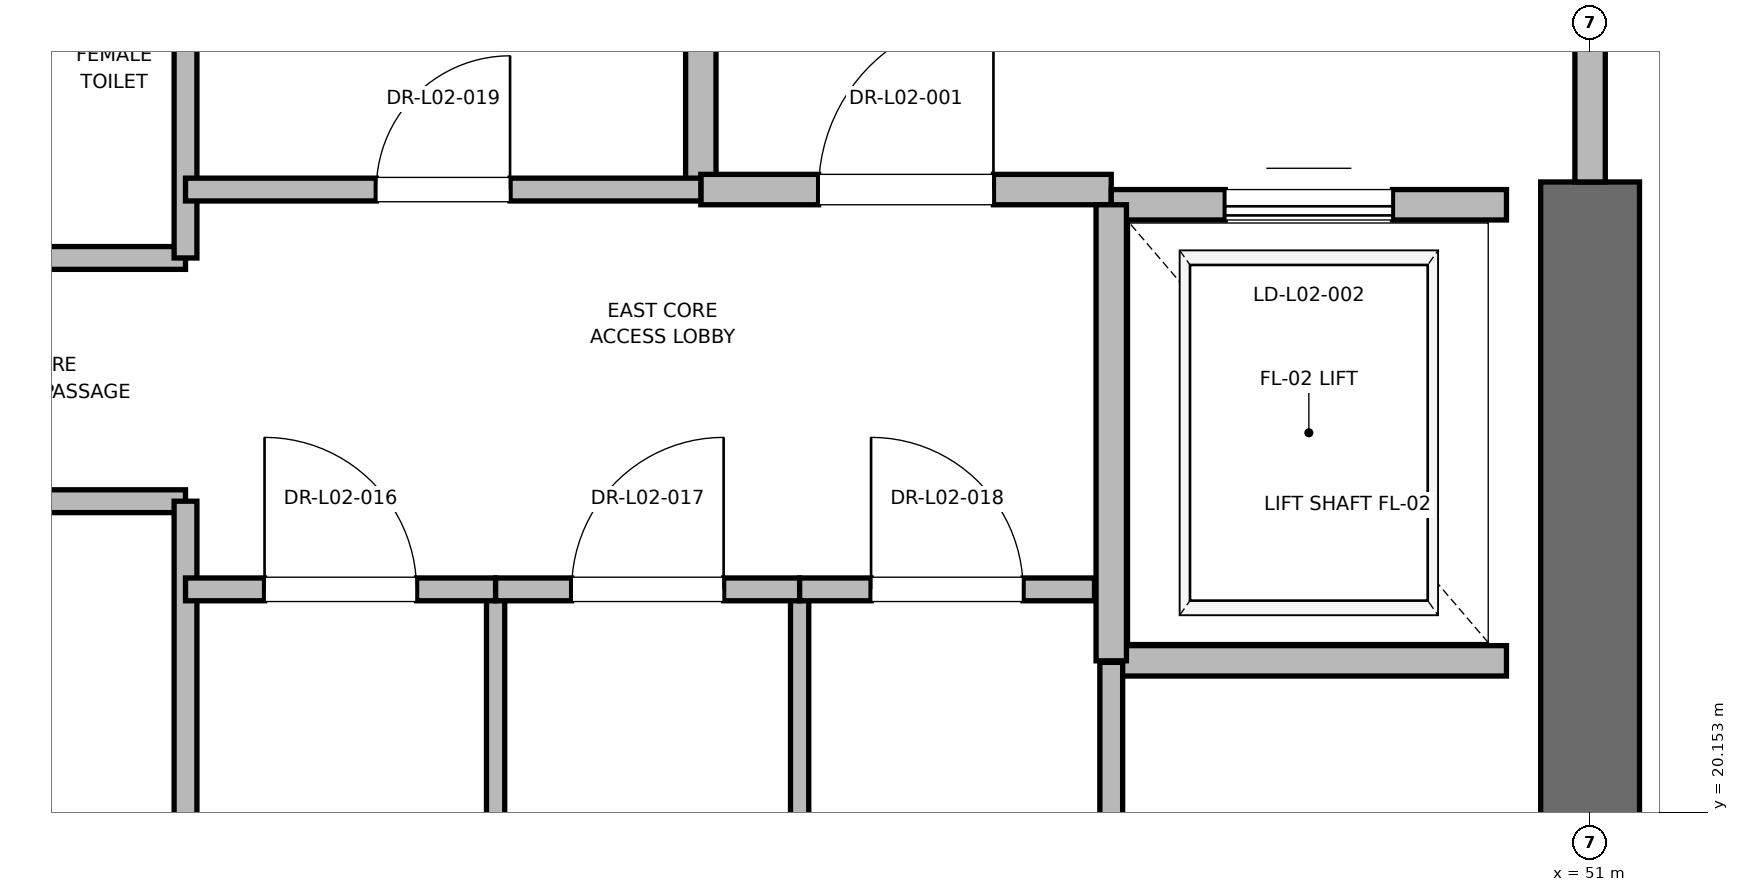
"""IFC4 building model, lengths in metres.
Left out: names, types, materials, properties, quantities, classifications, styles, units other than length and angle.
Written with IfcOpenShell. Run it as: python <this file> out.ifc"""

import sys

from ifc_helpers import new_model, si_unit, direction, frame, frame_2d, origin, place, context, subcontext, project, spatial, rectangle, extrude, element, fill, save


model = new_model("IFC4")
c1 = context("Model", 3, precision=1e-05, world=origin(), true_north=direction((0.0, 1.0)))
c2 = subcontext(c1, "Body", "Model", "MODEL_VIEW")
j1 = project(units=[si_unit("LENGTHUNIT", "METRE"), si_unit("PLANEANGLEUNIT", "RADIAN")], contexts=[c1])
p1 = place(None, origin())
s1 = spatial("IfcSite", under=j1, at=p1, CompositionType="ELEMENT")
p2 = place(p1, origin())
s2 = spatial("IfcBuilding", under=s1, at=p2, CompositionType="ELEMENT")
p3 = place(p2, frame((0.0, 0.0, 11.2)))
s3 = spatial("IfcBuildingStorey", under=s2, at=p3, CompositionType="ELEMENT", Elevation=11.2)
p4 = place(p3, frame((51.0, 18.5, 0.0), z_axis=(0.0, 0.0, 1.0), x_axis=(0.0, 1.0, 0.0)))
e1 = element("IfcWall", 1, at=p4, inside=s3, PredefinedType="SHEAR", context=c2, shape_type="SweptSolid", body=[
    extrude(rectangle(XDim=5.8, YDim=0.65, at=frame_2d((2.9, 0.0))), origin(), (0.0, 0.0, 1.0), 4.92),
])
p5 = place(p3, frame((45.15, 24.25, 0.0), z_axis=(0.0, 0.0, 1.0), x_axis=(0.0, 1.0, 0.0)))
e2 = element("IfcWall", 2, at=p5, inside=s3, PredefinedType="PARTITIONING", context=c2, shape_type="SweptSolid", body=[
    extrude(rectangle(XDim=3.37, YDim=0.2, at=frame_2d((1.685, 0.0))), origin(), (0.0, 0.0, 1.0), 4.92),
])
p6 = place(p3, frame((45.15, 24.25, 0.0), z_axis=(0.0, 0.0, 1.0), x_axis=(1.0, 0.0, 0.0)))
e3 = element("IfcWall", 3, at=p6, inside=s3, PredefinedType="PARTITIONING", context=c2, shape_type="SweptSolid", body=[
    extrude(rectangle(XDim=2.7, YDim=0.2, at=frame_2d((1.35, 0.0))), origin(), (0.0, 0.0, 1.0), 4.92),
])
p7 = place(p6, frame((0.775, 0.0, 0.0)))
e4 = element("IfcOpeningElement", 4, at=p7, cuts=e3, PredefinedType="OPENING", context=c2, shape_type="SweptSolid", body=[
    extrude(rectangle(XDim=1.15, YDim=2.2, at=frame_2d((0.575, 1.1))), frame((0.0, 0.1, 0.0), z_axis=(0.0, -1.0, 0.0), x_axis=(1.0, 0.0, 0.0)), (0.0, 0.0, 1.0), 0.2),
])
p8 = place(p3, frame((51.0, 24.3, 0.0), z_axis=(0.0, 0.0, 1.0), x_axis=(0.0, 1.0, 0.0)))
e5 = element("IfcWall", 5, at=p8, inside=s3, PredefinedType="PARTITIONING", context=c2, shape_type="SweptSolid", body=[
    extrude(rectangle(XDim=3.4, YDim=0.2, at=frame_2d((1.7, 0.0))), origin(), (0.0, 0.0, 1.0), 3.7),
])
p9 = place(p8, frame((1.125, 0.0, 0.0)))
e6 = element("IfcOpeningElement", 6, at=p9, cuts=e5, PredefinedType="OPENING", context=c2, shape_type="SweptSolid", body=[
    extrude(rectangle(XDim=1.15, YDim=2.2, at=frame_2d((0.575, 1.1))), frame((0.0, 0.1, 0.0), z_axis=(0.0, -1.0, 0.0), x_axis=(1.0, 0.0, 0.0)), (0.0, 0.0, 1.0), 0.2),
])
p10 = place(p3, frame((47.85, 21.15, 0.0), z_axis=(0.0, 0.0, 1.0), x_axis=(1.0, 0.0, 0.0)))
e7 = element("IfcWall", 7, at=p10, inside=s3, PredefinedType="SOLIDWALL", context=c2, shape_type="SweptSolid", body=[
    extrude(rectangle(XDim=2.6, YDim=0.2, at=frame_2d((1.3, 0.0))), origin(), (0.0, 0.0, 1.0), 4.92),
])
p11 = place(p3, frame((50.45, 24.15, 0.0), z_axis=(0.0, 0.0, 1.0), x_axis=(-1.0, 0.0, 0.0)))
e8 = element("IfcWall", 8, at=p11, inside=s3, PredefinedType="SOLIDWALL", context=c2, shape_type="SweptSolid", body=[
    extrude(rectangle(XDim=2.6, YDim=0.2, at=frame_2d((1.3, 0.0))), origin(), (0.0, 0.0, 1.0), 3.7),
])
p12 = place(p11, frame((0.75, 0.0, 0.0)))
e9 = element("IfcOpeningElement", 9, at=p12, cuts=e8, PredefinedType="OPENING", context=c2, shape_type="SweptSolid", body=[
    extrude(rectangle(XDim=1.1, YDim=2.2, at=frame_2d((0.55, 1.1))), frame((0.0, 0.1, 0.0), z_axis=(0.0, -1.0, 0.0), x_axis=(1.0, 0.0, 0.0)), (0.0, 0.0, 1.0), 0.2),
])
p13 = place(p3, frame((47.85, 24.15, 0.0), z_axis=(0.0, 0.0, 1.0), x_axis=(0.0, -1.0, 0.0)))
e10 = element("IfcWall", 10, at=p13, inside=s3, PredefinedType="SOLIDWALL", context=c2, shape_type="SweptSolid", body=[
    extrude(rectangle(XDim=3.0, YDim=0.2, at=frame_2d((1.5, 0.0))), origin(), (0.0, 0.0, 1.0), 4.92),
])
for number, where, z_axis, x_axis in (
    (11, (39.95, 22.2, 0.0), (0.0, 0.0, 1.0), (1.0, 0.0, 0.0)),
    (12, (39.95, 23.8, 0.0), (0.0, 0.0, 1.0), (1.0, 0.0, 0.0)),
):
    element("IfcWall", number, at=place(p3, frame(where, z_axis=z_axis, x_axis=x_axis)), inside=s3, PredefinedType="PARTITIONING", context=c2, shape_type="SweptSolid", body=[
        extrude(rectangle(XDim=1.81, YDim=0.15, at=frame_2d((0.905, 0.0))), origin(), (0.0, 0.0, 1.0), 2.85),
    ])
p14 = place(p3, frame((41.76, 18.6, 0.0), z_axis=(0.0, 0.0, 1.0), x_axis=(0.0, 1.0, 0.0)))
e13 = element("IfcWall", 13, at=p14, inside=s3, PredefinedType="PARTITIONING", context=c2, shape_type="SweptSolid", body=[
    extrude(rectangle(XDim=3.6, YDim=0.15, at=frame_2d((1.8, 0.0))), origin(), (0.0, 0.0, 1.0), 2.85),
])
p15 = place(p3, frame((41.76, 23.8, 0.0), z_axis=(0.0, 0.0, 1.0), x_axis=(0.0, 1.0, 0.0)))
e14 = element("IfcWall", 14, at=p15, inside=s3, PredefinedType="PARTITIONING", context=c2, shape_type="SweptSolid", body=[
    extrude(rectangle(XDim=4.0, YDim=0.15, at=frame_2d((2.0, 0.0))), origin(), (0.0, 0.0, 1.0), 2.85),
])
p16 = place(p3, frame((47.85, 18.6, 0.0), z_axis=(0.0, 0.0, 1.0), x_axis=(0.0, 1.0, 0.0)))
e15 = element("IfcWall", 15, at=p16, inside=s3, PredefinedType="PARTITIONING", context=c2, shape_type="SweptSolid", body=[
    extrude(rectangle(XDim=2.54, YDim=0.15, at=frame_2d((1.27, 0.0))), origin(), (0.0, 0.0, 1.0), 2.85),
])
for number, where, z_axis, x_axis in (
    (16, (43.8, 18.6, 0.0), (0.0, 0.0, 1.0), (0.0, 1.0, 0.0)),
    (17, (45.8, 18.6, 0.0), (0.0, 0.0, 1.0), (0.0, 1.0, 0.0)),
):
    element("IfcWall", number, at=place(p3, frame(where, z_axis=z_axis, x_axis=x_axis)), inside=s3, PredefinedType="PARTITIONING", context=c2, shape_type="SweptSolid", body=[
        extrude(rectangle(XDim=3.02, YDim=0.12, at=frame_2d((1.51, 0.0))), origin(), (0.0, 0.0, 1.0), 2.85),
    ])
p17 = place(p3, frame((41.76, 21.62, 0.0), z_axis=(0.0, 0.0, 1.0), x_axis=(1.0, 0.0, 0.0)))
e18 = element("IfcWall", 18, at=p17, inside=s3, PredefinedType="PARTITIONING", context=c2, shape_type="SweptSolid", body=[
    extrude(rectangle(XDim=2.04, YDim=0.15, at=frame_2d((1.02, 0.0))), origin(), (0.0, 0.0, 1.0), 2.85),
])
p18 = place(p17, frame((0.52, 0.0, 0.0)))
e19 = element("IfcOpeningElement", 19, at=p18, cuts=e18, PredefinedType="OPENING", context=c2, shape_type="SweptSolid", body=[
    extrude(rectangle(XDim=1.0, YDim=2.15, at=frame_2d((0.5, 1.075))), frame((0.0, 0.075, 0.0), z_axis=(0.0, -1.0, 0.0), x_axis=(1.0, 0.0, 0.0)), (0.0, 0.0, 1.0), 0.15),
])
p19 = place(p3, frame((43.8, 21.62, 0.0), z_axis=(0.0, 0.0, 1.0), x_axis=(1.0, 0.0, 0.0)))
e20 = element("IfcWall", 20, at=p19, inside=s3, PredefinedType="PARTITIONING", context=c2, shape_type="SweptSolid", body=[
    extrude(rectangle(XDim=2.0, YDim=0.15, at=frame_2d((1.0, 0.0))), origin(), (0.0, 0.0, 1.0), 2.85),
])
p20 = place(p19, frame((0.5, 0.0, 0.0)))
e21 = element("IfcOpeningElement", 21, at=p20, cuts=e20, PredefinedType="OPENING", context=c2, shape_type="SweptSolid", body=[
    extrude(rectangle(XDim=1.0, YDim=2.15, at=frame_2d((0.5, 1.075))), frame((0.0, 0.075, 0.0), z_axis=(0.0, -1.0, 0.0), x_axis=(1.0, 0.0, 0.0)), (0.0, 0.0, 1.0), 0.15),
])
p21 = place(p3, frame((45.8, 21.62, 0.0), z_axis=(0.0, 0.0, 1.0), x_axis=(1.0, 0.0, 0.0)))
e22 = element("IfcWall", 22, at=p21, inside=s3, PredefinedType="PARTITIONING", context=c2, shape_type="SweptSolid", body=[
    extrude(rectangle(XDim=1.94, YDim=0.15, at=frame_2d((0.97, 0.0))), origin(), (0.0, 0.0, 1.0), 2.85),
])
p22 = place(p21, frame((0.47, 0.0, 0.0)))
e23 = element("IfcOpeningElement", 23, at=p22, cuts=e22, PredefinedType="OPENING", context=c2, shape_type="SweptSolid", body=[
    extrude(rectangle(XDim=1.0, YDim=2.15, at=frame_2d((0.5, 1.075))), frame((0.0, 0.075, 0.0), z_axis=(0.0, -1.0, 0.0), x_axis=(1.0, 0.0, 0.0)), (0.0, 0.0, 1.0), 0.15),
])
p23 = place(p3, frame((41.76, 24.25, 0.0), z_axis=(0.0, 0.0, 1.0), x_axis=(1.0, 0.0, 0.0)))
e24 = element("IfcWall", 24, at=p23, inside=s3, PredefinedType="PARTITIONING", context=c2, shape_type="SweptSolid", body=[
    extrude(rectangle(XDim=3.39, YDim=0.15, at=frame_2d((1.695, 0.0))), origin(), (0.0, 0.0, 1.0), 2.85),
])
p24 = place(p23, frame((1.255, 0.0, 0.0)))
e25 = element("IfcOpeningElement", 25, at=p24, cuts=e24, PredefinedType="OPENING", context=c2, shape_type="SweptSolid", body=[
    extrude(rectangle(XDim=0.88, YDim=2.1, at=frame_2d((0.44, 1.05))), frame((0.0, 0.075, 0.0), z_axis=(0.0, -1.0, 0.0), x_axis=(1.0, 0.0, 0.0)), (0.0, 0.0, 1.0), 0.15),
])
p25 = place(p7, origin())
e26 = element("IfcDoor", 26, at=p25, inside=s3, OperationType="SINGLE_SWING_RIGHT", PredefinedType="DOOR", context=c2, shape_type="SweptSolid", body=[
    extrude(rectangle(XDim=1.15, YDim=2.2, at=frame_2d((0.575, 1.1))), frame((0.0, 0.025, 0.0), z_axis=(0.0, -1.0, 0.0), x_axis=(1.0, 0.0, 0.0)), (0.0, 0.0, 1.0), 0.05),
])
fill(e4, e26)
p26 = place(p12, origin())
e27 = element("IfcDoor", 27, at=p26, inside=s3, OperationType="SLIDING_TO_RIGHT", PredefinedType="DOOR", context=c2, shape_type="SweptSolid", body=[
    extrude(rectangle(XDim=1.1, YDim=2.2, at=frame_2d((0.55, 1.1))), frame((0.0, 0.025, 0.0), z_axis=(0.0, -1.0, 0.0), x_axis=(1.0, 0.0, 0.0)), (0.0, 0.0, 1.0), 0.05),
])
fill(e9, e27)
p27 = place(p18, origin())
e28 = element("IfcDoor", 28, at=p27, inside=s3, OperationType="SINGLE_SWING_LEFT", PredefinedType="DOOR", context=c2, shape_type="SweptSolid", body=[
    extrude(rectangle(XDim=1.0, YDim=2.15, at=frame_2d((0.5, 1.075))), frame((0.0, 0.025, 0.0), z_axis=(0.0, -1.0, 0.0), x_axis=(1.0, 0.0, 0.0)), (0.0, 0.0, 1.0), 0.05),
])
fill(e19, e28)
p28 = place(p20, origin())
e29 = element("IfcDoor", 29, at=p28, inside=s3, OperationType="SINGLE_SWING_RIGHT", PredefinedType="DOOR", context=c2, shape_type="SweptSolid", body=[
    extrude(rectangle(XDim=1.0, YDim=2.15, at=frame_2d((0.5, 1.075))), frame((0.0, 0.025, 0.0), z_axis=(0.0, -1.0, 0.0), x_axis=(1.0, 0.0, 0.0)), (0.0, 0.0, 1.0), 0.05),
])
fill(e21, e29)
p29 = place(p22, origin())
e30 = element("IfcDoor", 30, at=p29, inside=s3, OperationType="SINGLE_SWING_LEFT", PredefinedType="DOOR", context=c2, shape_type="SweptSolid", body=[
    extrude(rectangle(XDim=1.0, YDim=2.15, at=frame_2d((0.5, 1.075))), frame((0.0, 0.025, 0.0), z_axis=(0.0, -1.0, 0.0), x_axis=(1.0, 0.0, 0.0)), (0.0, 0.0, 1.0), 0.05),
])
fill(e23, e30)
p30 = place(p24, origin())
e31 = element("IfcDoor", 31, at=p30, inside=s3, OperationType="SINGLE_SWING_RIGHT", PredefinedType="DOOR", context=c2, shape_type="SweptSolid", body=[
    extrude(rectangle(XDim=0.88, YDim=2.1, at=frame_2d((0.44, 1.05))), frame((0.0, 0.025, 0.0), z_axis=(0.0, -1.0, 0.0), x_axis=(1.0, 0.0, 0.0)), (0.0, 0.0, 1.0), 0.05),
])
fill(e25, e31)
save(model, sys.argv[1])
